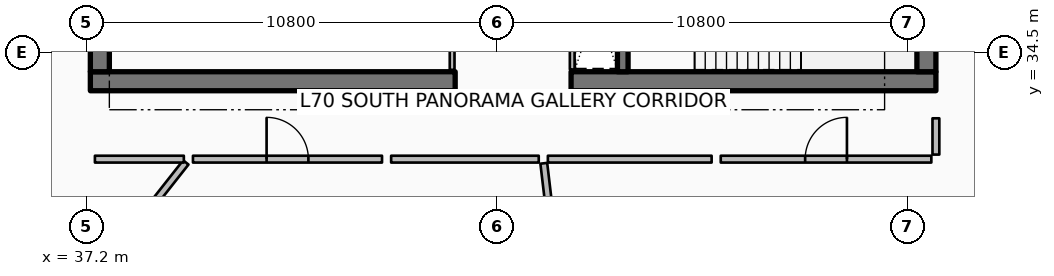
"""IFC4 building model, lengths in metres.
Left out: names, types, materials, properties, quantities, classifications, styles, units other than length and angle.
Written with IfcOpenShell. Run it as: python <this file> out.ifc"""

import sys

from ifc_helpers import new_model, si_unit, direction, frame, frame_2d, origin, place, context, subcontext, project, spatial, rectangle, extrude, element, fill, save


model = new_model("IFC4")
c1 = context("Model", 3, precision=1e-05, world=origin(), true_north=direction((0.0, 1.0)))
c2 = subcontext(c1, "Body", "Model", "MODEL_VIEW")
j1 = project(units=[si_unit("LENGTHUNIT", "METRE"), si_unit("PLANEANGLEUNIT", "RADIAN")], contexts=[c1])
p1 = place(None, origin())
s1 = spatial("IfcSite", under=j1, at=p1, CompositionType="ELEMENT")
p2 = place(p1, origin())
s2 = spatial("IfcBuilding", under=s1, at=p2, CompositionType="ELEMENT")
p3 = place(p2, frame((0.0, 0.0, 279.05)))
s3 = spatial("IfcBuildingStorey", under=s2, at=p3, CompositionType="ELEMENT", Elevation=279.05)
p4 = place(p3, frame((37.3, 33.75, 0.0), z_axis=(0.0, 0.0, 1.0), x_axis=(1.0, 0.0, 0.0)))
e1 = element("IfcWall", 1, at=p4, inside=s3, PredefinedType="SHEAR", context=c2, shape_type="SweptSolid", body=[
    extrude(rectangle(XDim=9.6, YDim=0.5, at=frame_2d((4.8, 0.0))), origin(), (0.0, 0.0, 1.0), 3.85),
])
p5 = place(p3, frame((49.95, 33.75, 0.0), z_axis=(0.0, 0.0, 1.0), x_axis=(1.0, 0.0, 0.0)))
e2 = element("IfcWall", 2, at=p5, inside=s3, PredefinedType="SHEAR", context=c2, shape_type="SweptSolid", body=[
    extrude(rectangle(XDim=9.6, YDim=0.5, at=frame_2d((4.8, 0.0))), origin(), (0.0, 0.0, 1.0), 3.85),
])
for number, where, z_axis, x_axis in (
    (3, (37.55, 34.0, 0.0), (0.0, 0.0, 1.0), (0.0, 1.0, 0.0)),
    (4, (59.3, 34.0, 0.0), (0.0, 0.0, 1.0), (0.0, 1.0, 0.0)),
):
    element("IfcWall", number, at=place(p3, frame(where, z_axis=z_axis, x_axis=x_axis)), inside=s3, PredefinedType="SHEAR", context=c2, shape_type="SweptSolid", body=[
        extrude(rectangle(XDim=16.0, YDim=0.5, at=frame_2d((8.0, 0.0))), origin(), (0.0, 0.0, 1.0), 3.85),
    ])
p6 = place(p3, frame((51.31, 34.0, 0.0), z_axis=(0.0, 0.0, 1.0), x_axis=(0.0, 1.0, 0.0)))
e5 = element("IfcWall", 5, at=p6, inside=s3, PredefinedType="SHEAR", context=c2, shape_type="SweptSolid", body=[
    extrude(rectangle(XDim=3.5, YDim=0.28, at=frame_2d((1.75, 0.0))), origin(), (0.0, 0.0, 1.0), 3.85),
])
p7 = place(p3, frame((46.82, 34.05, 0.0), z_axis=(0.0, 0.0, 1.0), x_axis=(0.0, 1.0, 0.0)))
e6 = element("IfcWall", 6, at=p7, inside=s3, PredefinedType="PARTITIONING", context=c2, shape_type="SweptSolid", body=[
    extrude(rectangle(XDim=2.03, YDim=0.125, at=frame_2d((1.015, 0.0))), origin(), (0.0, 0.0, 1.0), 3.03),
])
p8 = place(p3, frame((49.98, 34.06, 0.0), z_axis=(0.0, 0.0, 1.0), x_axis=(0.0, 1.0, 0.0)))
e7 = element("IfcWall", 7, at=p8, inside=s3, PredefinedType="PARTITIONING", context=c2, shape_type="SweptSolid", body=[
    extrude(rectangle(XDim=3.4, YDim=0.125, at=frame_2d((1.7, 0.0))), origin(), (0.0, 0.0, 1.0), 3.03),
])
p9 = place(p3, frame((39.812, 31.614, 0.0), z_axis=(0.0, 0.0, 1.0), x_axis=(-0.619097230176, -0.785314344443, 0.0)))
e8 = element("IfcWall", 8, at=p9, inside=s3, PredefinedType="PARTITIONING", context=c2, shape_type="SweptSolid", body=[
    extrude(rectangle(XDim=16.37, YDim=0.18, at=frame_2d((8.185, 0.0))), origin(), (0.0, 0.0, 1.0), 2.957),
])
p10 = place(p3, frame((49.232, 31.591, 0.0), z_axis=(0.0, 0.0, 1.0), x_axis=(0.117545848714, -0.993067456646, 0.0)))
e9 = element("IfcWall", 9, at=p10, inside=s3, PredefinedType="PARTITIONING", context=c2, shape_type="SweptSolid", body=[
    extrude(rectangle(XDim=14.213, YDim=0.18, at=frame_2d((7.106, 0.0))), origin(), (0.0, 0.0, 1.0), 2.957),
])
p11 = place(p3, frame((59.656, 38.713, 0.0), z_axis=(0.0, 0.0, 1.0), x_axis=(0.962454756022, -0.27144215334, 0.0)))
e10 = element("IfcWall", 10, at=p11, inside=s3, PredefinedType="PARTITIONING", context=c2, shape_type="SweptSolid", body=[
    extrude(rectangle(XDim=17.385, YDim=0.18, at=frame_2d((8.692, 0.0))), origin(), (0.0, 0.0, 1.0), 2.957),
])
p12 = place(p3, frame((37.42, 31.7, 0.0), z_axis=(0.0, 0.0, 1.0), x_axis=(1.0, 0.0, 0.0)))
e11 = element("IfcWall", 11, at=p12, inside=s3, PredefinedType="PARTITIONING", context=c2, shape_type="SweptSolid", body=[
    extrude(rectangle(XDim=2.34, YDim=0.18, at=frame_2d((1.17, 0.0))), origin(), (0.0, 0.0, 1.0), 2.957),
])
p13 = place(p3, frame((40.0, 31.7, 0.0), z_axis=(0.0, 0.0, 1.0), x_axis=(1.0, 0.0, 0.0)))
e12 = element("IfcWall", 12, at=p13, inside=s3, PredefinedType="PARTITIONING", context=c2, shape_type="SweptSolid", body=[
    extrude(rectangle(XDim=4.975, YDim=0.18, at=frame_2d((2.488, 0.0))), origin(), (0.0, 0.0, 1.0), 2.957),
])
p14 = place(p13, frame((1.938, 0.0, 0.0)))
e13 = element("IfcOpeningElement", 13, at=p14, cuts=e12, PredefinedType="OPENING", context=c2, shape_type="SweptSolid", body=[
    extrude(rectangle(XDim=1.1, YDim=2.1, at=frame_2d((0.55, 1.05))), frame((0.0, 0.1, 0.0), z_axis=(0.0, -1.0, 0.0), x_axis=(1.0, 0.0, 0.0)), (0.0, 0.0, 1.0), 0.2),
])
p15 = place(p3, frame((45.215, 31.7, 0.0), z_axis=(0.0, 0.0, 1.0), x_axis=(1.0, 0.0, 0.0)))
e14 = element("IfcWall", 14, at=p15, inside=s3, PredefinedType="PARTITIONING", context=c2, shape_type="SweptSolid", body=[
    extrude(rectangle(XDim=3.884, YDim=0.18, at=frame_2d((1.942, 0.0))), origin(), (0.0, 0.0, 1.0), 2.957),
])
p16 = place(p3, frame((53.888, 31.7, 0.0), z_axis=(0.0, 0.0, 1.0), x_axis=(1.0, 0.0, 0.0)))
e15 = element("IfcWall", 15, at=p16, inside=s3, PredefinedType="PARTITIONING", context=c2, shape_type="SweptSolid", body=[
    extrude(rectangle(XDim=5.542, YDim=0.18, at=frame_2d((2.771, 0.0))), origin(), (0.0, 0.0, 1.0), 2.957),
])
p17 = place(p16, frame((2.221, 0.0, 0.0)))
e16 = element("IfcOpeningElement", 16, at=p17, cuts=e15, PredefinedType="OPENING", context=c2, shape_type="SweptSolid", body=[
    extrude(rectangle(XDim=1.1, YDim=2.1, at=frame_2d((0.55, 1.05))), frame((0.0, 0.1, 0.0), z_axis=(0.0, -1.0, 0.0), x_axis=(1.0, 0.0, 0.0)), (0.0, 0.0, 1.0), 0.2),
])
p18 = place(p3, frame((59.55, 31.82, 0.0), z_axis=(0.0, 0.0, 1.0), x_axis=(0.0, 1.0, 0.0)))
e17 = element("IfcWall", 17, at=p18, inside=s3, PredefinedType="PARTITIONING", context=c2, shape_type="SweptSolid", body=[
    extrude(rectangle(XDim=0.955, YDim=0.18, at=frame_2d((0.477, 0.0))), origin(), (0.0, 0.0, 1.0), 2.957),
])
p19 = place(p3, frame((49.339, 31.7, 0.0), z_axis=(0.0, 0.0, 1.0), x_axis=(1.0, 0.0, 0.0)))
e18 = element("IfcWall", 18, at=p19, inside=s3, PredefinedType="PARTITIONING", context=c2, shape_type="SweptSolid", body=[
    extrude(rectangle(XDim=4.309, YDim=0.18, at=frame_2d((2.155, 0.0))), origin(), (0.0, 0.0, 1.0), 2.957),
])
p20 = place(p14, origin())
e19 = element("IfcDoor", 19, at=p20, inside=s3, OperationType="SINGLE_SWING_LEFT", PredefinedType="DOOR", context=c2, shape_type="SweptSolid", body=[
    extrude(rectangle(XDim=1.1, YDim=2.1, at=frame_2d((0.55, 1.05))), frame((0.0, 0.025, 0.0), z_axis=(0.0, -1.0, 0.0), x_axis=(1.0, 0.0, 0.0)), (0.0, 0.0, 1.0), 0.05),
])
fill(e13, e19)
p21 = place(p17, origin())
e20 = element("IfcDoor", 20, at=p21, inside=s3, OperationType="SINGLE_SWING_RIGHT", PredefinedType="DOOR", context=c2, shape_type="SweptSolid", body=[
    extrude(rectangle(XDim=1.1, YDim=2.1, at=frame_2d((0.55, 1.05))), frame((0.0, 0.025, 0.0), z_axis=(0.0, -1.0, 0.0), x_axis=(1.0, 0.0, 0.0)), (0.0, 0.0, 1.0), 0.05),
])
fill(e16, e20)
save(model, sys.argv[1])
